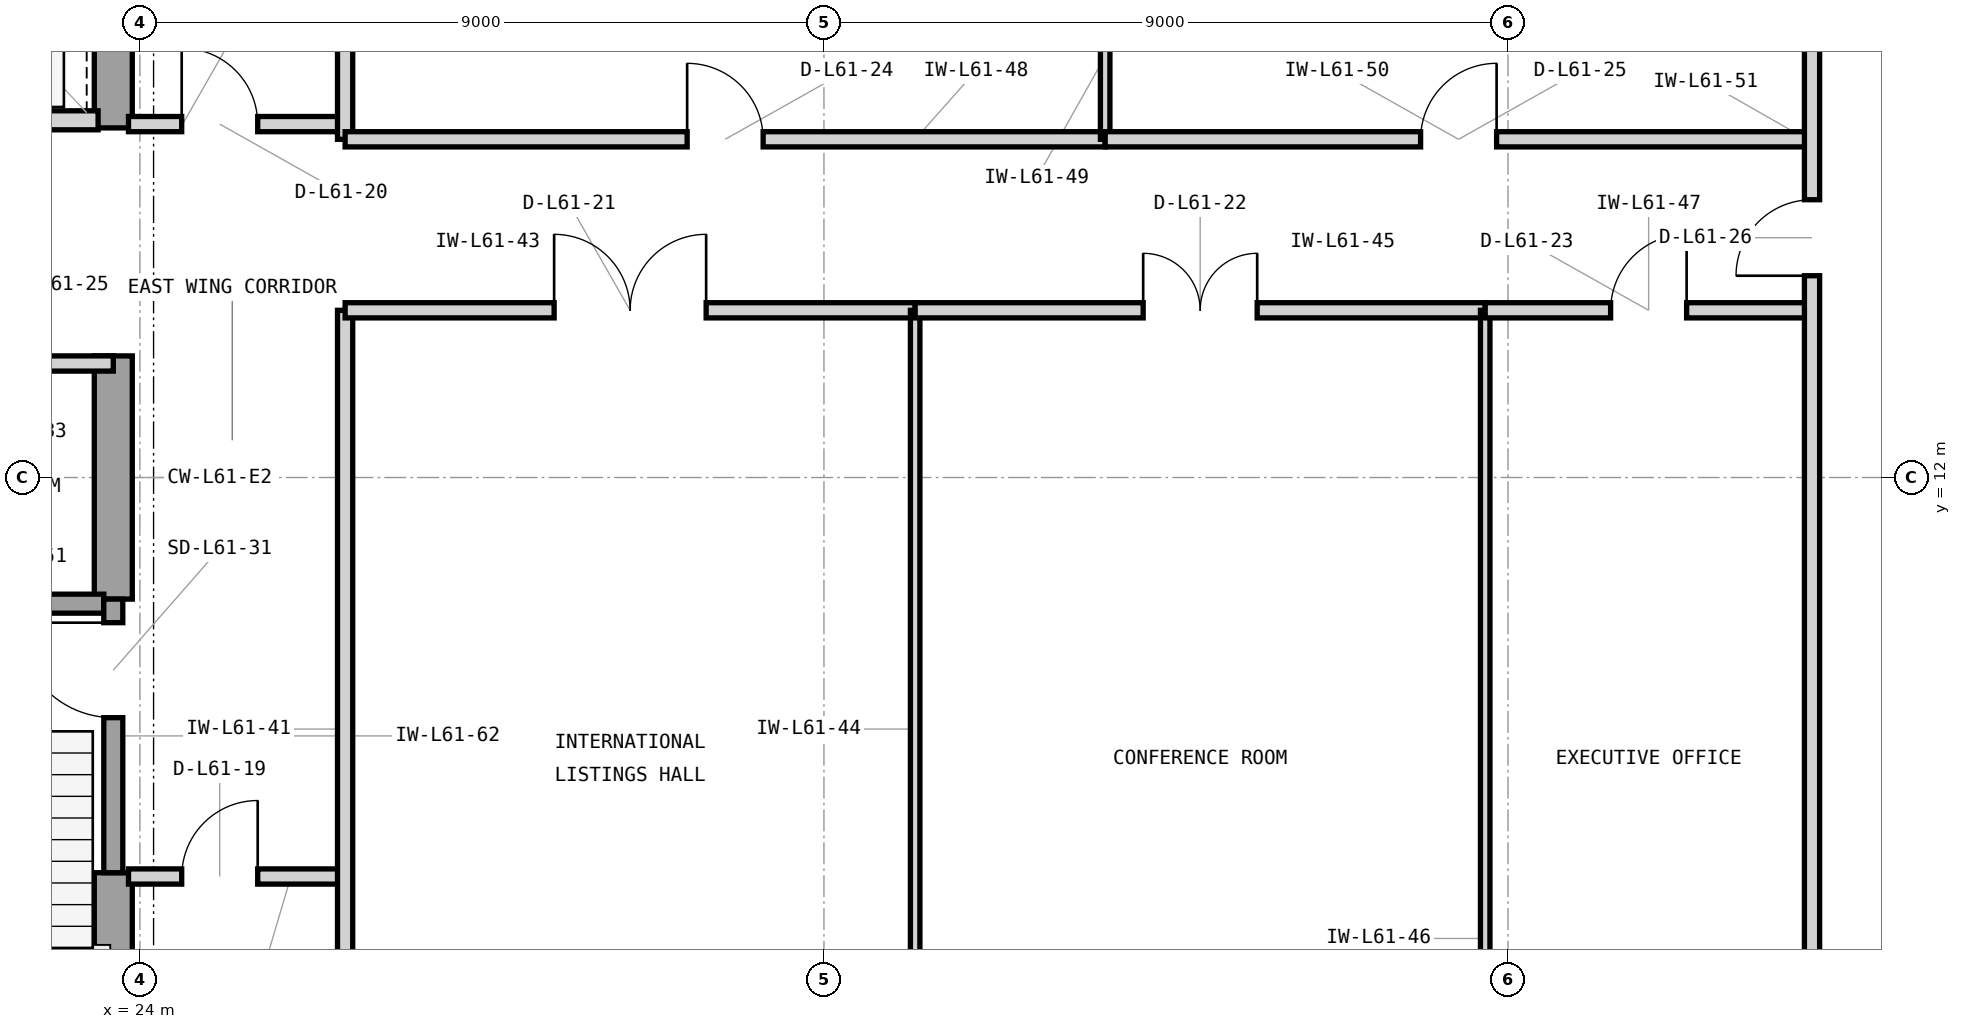
"""IFC4 building model, lengths in metres.
Left out: names, types, materials, properties, quantities, classifications, styles, units other than length and angle.
Written with IfcOpenShell. Run it as: python <this file> out.ifc"""

import sys

from ifc_helpers import new_model, si_unit, direction, frame, frame_2d, origin, place, context, subcontext, project, spatial, rectangle, extrude, element, fill, save


model = new_model("IFC4")
c1 = context("Model", 3, precision=1e-05, world=origin(), true_north=direction((0.0, 1.0)))
c2 = subcontext(c1, "Body", "Model", "MODEL_VIEW")
j1 = project(units=[si_unit("LENGTHUNIT", "METRE"), si_unit("PLANEANGLEUNIT", "RADIAN")], contexts=[c1])
p1 = place(None, origin())
s1 = spatial("IfcSite", under=j1, at=p1, CompositionType="ELEMENT")
p2 = place(p1, origin())
s2 = spatial("IfcBuilding", under=s1, at=p2, CompositionType="ELEMENT")
p3 = place(p2, frame((0.0, 0.0, 250.8)))
s3 = spatial("IfcBuildingStorey", under=s2, at=p3, CompositionType="ELEMENT", Elevation=250.8)
p4 = place(p3, frame((23.65, 3.6, 0.0), z_axis=(0.0, 0.0, 1.0), x_axis=(0.0, 1.0, 0.0)))
e1 = element("IfcWall", 1, at=p4, inside=s3, PredefinedType="SHEAR", context=c2, shape_type="SweptSolid", body=[
    extrude(rectangle(XDim=3.2, YDim=0.5, at=frame_2d((1.6, 0.0))), origin(), (0.0, 0.0, 1.0), 3.9),
])
p5 = place(p3, frame((23.65, 10.4, 0.0), z_axis=(0.0, 0.0, 1.0), x_axis=(0.0, 1.0, 0.0)))
e2 = element("IfcWall", 2, at=p5, inside=s3, PredefinedType="SHEAR", context=c2, shape_type="SweptSolid", body=[
    extrude(rectangle(XDim=3.2, YDim=0.5, at=frame_2d((1.6, 0.0))), origin(), (0.0, 0.0, 1.0), 3.9),
])
p6 = place(p3, frame((23.65, 16.6, 0.0), z_axis=(0.0, 0.0, 1.0), x_axis=(0.0, 1.0, 0.0)))
e3 = element("IfcWall", 3, at=p6, inside=s3, PredefinedType="SHEAR", context=c2, shape_type="SweptSolid", body=[
    extrude(rectangle(XDim=4.05, YDim=0.5, at=frame_2d((2.025, 0.0))), origin(), (0.0, 0.0, 1.0), 3.9),
])
p7 = place(p3, frame((21.05, 16.7, 0.0), z_axis=(0.0, 0.0, 1.0), x_axis=(1.0, 0.0, 0.0)))
e4 = element("IfcWall", 4, at=p7, inside=s3, PredefinedType="PARTITIONING", context=c2, shape_type="SweptSolid", body=[
    extrude(rectangle(XDim=2.4, YDim=0.25, at=frame_2d((1.2, 0.0))), origin(), (0.0, 0.0, 1.0), 3.088),
])
p8 = place(p7, frame((0.52, 0.0, 0.0)))
e5 = element("IfcOpeningElement", 5, at=p8, cuts=e4, PredefinedType="OPENING", context=c2, shape_type="SweptSolid", body=[
    extrude(rectangle(XDim=1.15, YDim=2.25, at=frame_2d((0.575, 1.125))), frame((0.0, 0.135, 0.0), z_axis=(0.0, -1.0, 0.0), x_axis=(1.0, 0.0, 0.0)), (0.0, 0.0, 1.0), 0.27),
])
p9 = place(p3, frame((18.45, 13.5, 0.0), z_axis=(0.0, 0.0, 1.0), x_axis=(1.0, 0.0, 0.0)))
e6 = element("IfcWall", 6, at=p9, inside=s3, PredefinedType="PARTITIONING", context=c2, shape_type="SweptSolid", body=[
    extrude(rectangle(XDim=5.2, YDim=0.2, at=frame_2d((2.6, 0.0))), origin(), (0.0, 0.0, 1.0), 3.088),
])
p10 = place(p9, frame((2.125, 0.0, 0.0)))
e7 = element("IfcOpeningElement", 7, at=p10, cuts=e6, PredefinedType="OPENING", context=c2, shape_type="SweptSolid", body=[
    extrude(rectangle(XDim=0.95, YDim=2.1, at=frame_2d((0.475, 1.05))), frame((0.0, 0.11, 0.0), z_axis=(0.0, -1.0, 0.0), x_axis=(1.0, 0.0, 0.0)), (0.0, 0.0, 1.0), 0.22),
])
p11 = place(p3, frame((23.85, 6.75, 0.0), z_axis=(0.0, 0.0, 1.0), x_axis=(1.0, 0.0, 0.0)))
e8 = element("IfcWall", 8, at=p11, inside=s3, PredefinedType="PARTITIONING", context=c2, shape_type="SweptSolid", body=[
    extrude(rectangle(XDim=2.85, YDim=0.2, at=frame_2d((1.425, 0.0))), origin(), (0.0, 0.0, 1.0), 3.63),
])
p12 = place(p11, frame((0.7, 0.0, 0.0)))
e9 = element("IfcOpeningElement", 9, at=p12, cuts=e8, PredefinedType="OPENING", context=c2, shape_type="SweptSolid", body=[
    extrude(rectangle(XDim=1.0, YDim=2.15, at=frame_2d((0.5, 1.075))), frame((0.0, 0.11, 0.0), z_axis=(0.0, -1.0, 0.0), x_axis=(1.0, 0.0, 0.0)), (0.0, 0.0, 1.0), 0.22),
])
p13 = place(p3, frame((23.85, 16.65, 0.0), z_axis=(0.0, 0.0, 1.0), x_axis=(1.0, 0.0, 0.0)))
e10 = element("IfcWall", 10, at=p13, inside=s3, PredefinedType="PARTITIONING", context=c2, shape_type="SweptSolid", body=[
    extrude(rectangle(XDim=2.85, YDim=0.2, at=frame_2d((1.425, 0.0))), origin(), (0.0, 0.0, 1.0), 3.63),
])
p14 = place(p13, frame((0.7, 0.0, 0.0)))
e11 = element("IfcOpeningElement", 11, at=p14, cuts=e10, PredefinedType="OPENING", context=c2, shape_type="SweptSolid", body=[
    extrude(rectangle(XDim=1.0, YDim=2.15, at=frame_2d((0.5, 1.075))), frame((0.0, 0.11, 0.0), z_axis=(0.0, -1.0, 0.0), x_axis=(1.0, 0.0, 0.0)), (0.0, 0.0, 1.0), 0.22),
])
p15 = place(p3, frame((26.7, 3.18, 0.0), z_axis=(0.0, 0.0, 1.0), x_axis=(0.0, 1.0, 0.0)))
e12 = element("IfcWall", 12, at=p15, inside=s3, PredefinedType="PARTITIONING", context=c2, shape_type="SweptSolid", body=[
    extrude(rectangle(XDim=11.02, YDim=0.2, at=frame_2d((5.51, 0.0))), origin(), (0.0, 0.0, 1.0), 3.63),
])
p16 = place(p3, frame((26.7, 16.45, 0.0), z_axis=(0.0, 0.0, 1.0), x_axis=(0.0, 1.0, 0.0)))
e13 = element("IfcWall", 13, at=p16, inside=s3, PredefinedType="PARTITIONING", context=c2, shape_type="SweptSolid", body=[
    extrude(rectangle(XDim=4.37, YDim=0.2, at=frame_2d((2.185, 0.0))), origin(), (0.0, 0.0, 1.0), 3.63),
])
p17 = place(p3, frame((26.7, 14.2, 0.0), z_axis=(0.0, 0.0, 1.0), x_axis=(1.0, 0.0, 0.0)))
e14 = element("IfcWall", 14, at=p17, inside=s3, PredefinedType="PARTITIONING", context=c2, shape_type="SweptSolid", body=[
    extrude(rectangle(XDim=7.5, YDim=0.2, at=frame_2d((3.75, 0.0))), origin(), (0.0, 0.0, 1.0), 3.63),
])
p18 = place(p17, frame((2.75, 0.0, 0.0)))
e15 = element("IfcOpeningElement", 15, at=p18, cuts=e14, PredefinedType="OPENING", context=c2, shape_type="SweptSolid", body=[
    extrude(rectangle(XDim=2.0, YDim=2.5, at=frame_2d((1.0, 1.25))), frame((0.0, 0.11, 0.0), z_axis=(0.0, -1.0, 0.0), x_axis=(1.0, 0.0, 0.0)), (0.0, 0.0, 1.0), 0.22),
])
p19 = place(p3, frame((34.2, 3.18, 0.0), z_axis=(0.0, 0.0, 1.0), x_axis=(0.0, 1.0, 0.0)))
e16 = element("IfcWall", 16, at=p19, inside=s3, PredefinedType="PARTITIONING", context=c2, shape_type="SweptSolid", body=[
    extrude(rectangle(XDim=11.02, YDim=0.125, at=frame_2d((5.51, 0.0))), origin(), (0.0, 0.0, 1.0), 3.63),
])
p20 = place(p3, frame((34.2, 14.2, 0.0), z_axis=(0.0, 0.0, 1.0), x_axis=(1.0, 0.0, 0.0)))
e17 = element("IfcWall", 17, at=p20, inside=s3, PredefinedType="PARTITIONING", context=c2, shape_type="SweptSolid", body=[
    extrude(rectangle(XDim=7.5, YDim=0.2, at=frame_2d((3.75, 0.0))), origin(), (0.0, 0.0, 1.0), 3.63),
])
p21 = place(p20, frame((3.0, 0.0, 0.0)))
e18 = element("IfcOpeningElement", 18, at=p21, cuts=e17, PredefinedType="OPENING", context=c2, shape_type="SweptSolid", body=[
    extrude(rectangle(XDim=1.5, YDim=2.3, at=frame_2d((0.75, 1.15))), frame((0.0, 0.11, 0.0), z_axis=(0.0, -1.0, 0.0), x_axis=(1.0, 0.0, 0.0)), (0.0, 0.0, 1.0), 0.22),
])
p22 = place(p3, frame((41.7, 3.18, 0.0), z_axis=(0.0, 0.0, 1.0), x_axis=(0.0, 1.0, 0.0)))
e19 = element("IfcWall", 19, at=p22, inside=s3, PredefinedType="PARTITIONING", context=c2, shape_type="SweptSolid", body=[
    extrude(rectangle(XDim=11.02, YDim=0.125, at=frame_2d((5.51, 0.0))), origin(), (0.0, 0.0, 1.0), 3.63),
])
p23 = place(p3, frame((41.7, 14.2, 0.0), z_axis=(0.0, 0.0, 1.0), x_axis=(1.0, 0.0, 0.0)))
e20 = element("IfcWall", 20, at=p23, inside=s3, PredefinedType="PARTITIONING", context=c2, shape_type="SweptSolid", body=[
    extrude(rectangle(XDim=4.3, YDim=0.2, at=frame_2d((2.15, 0.0))), origin(), (0.0, 0.0, 1.0), 3.63),
])
p24 = place(p23, frame((1.65, 0.0, 0.0)))
e21 = element("IfcOpeningElement", 21, at=p24, cuts=e20, PredefinedType="OPENING", context=c2, shape_type="SweptSolid", body=[
    extrude(rectangle(XDim=1.0, YDim=2.15, at=frame_2d((0.5, 1.075))), frame((0.0, 0.11, 0.0), z_axis=(0.0, -1.0, 0.0), x_axis=(1.0, 0.0, 0.0)), (0.0, 0.0, 1.0), 0.22),
])
p25 = place(p3, frame((26.7, 16.45, 0.0), z_axis=(0.0, 0.0, 1.0), x_axis=(1.0, 0.0, 0.0)))
e22 = element("IfcWall", 22, at=p25, inside=s3, PredefinedType="PARTITIONING", context=c2, shape_type="SweptSolid", body=[
    extrude(rectangle(XDim=10.0, YDim=0.2, at=frame_2d((5.0, 0.0))), origin(), (0.0, 0.0, 1.0), 3.63),
])
p26 = place(p25, frame((4.5, 0.0, 0.0)))
e23 = element("IfcOpeningElement", 23, at=p26, cuts=e22, PredefinedType="OPENING", context=c2, shape_type="SweptSolid", body=[
    extrude(rectangle(XDim=1.0, YDim=2.15, at=frame_2d((0.5, 1.075))), frame((0.0, 0.11, 0.0), z_axis=(0.0, -1.0, 0.0), x_axis=(1.0, 0.0, 0.0)), (0.0, 0.0, 1.0), 0.22),
])
p27 = place(p3, frame((36.7, 16.45, 0.0), z_axis=(0.0, 0.0, 1.0), x_axis=(0.0, 1.0, 0.0)))
e24 = element("IfcWall", 24, at=p27, inside=s3, PredefinedType="PARTITIONING", context=c2, shape_type="SweptSolid", body=[
    extrude(rectangle(XDim=4.37, YDim=0.125, at=frame_2d((2.185, 0.0))), origin(), (0.0, 0.0, 1.0), 3.63),
])
p28 = place(p3, frame((36.7, 16.45, 0.0), z_axis=(0.0, 0.0, 1.0), x_axis=(1.0, 0.0, 0.0)))
e25 = element("IfcWall", 25, at=p28, inside=s3, PredefinedType="PARTITIONING", context=c2, shape_type="SweptSolid", body=[
    extrude(rectangle(XDim=9.3, YDim=0.2, at=frame_2d((4.65, 0.0))), origin(), (0.0, 0.0, 1.0), 3.63),
])
p29 = place(p28, frame((4.15, 0.0, 0.0)))
e26 = element("IfcOpeningElement", 26, at=p29, cuts=e25, PredefinedType="OPENING", context=c2, shape_type="SweptSolid", body=[
    extrude(rectangle(XDim=1.0, YDim=2.15, at=frame_2d((0.5, 1.075))), frame((0.0, 0.11, 0.0), z_axis=(0.0, -1.0, 0.0), x_axis=(1.0, 0.0, 0.0)), (0.0, 0.0, 1.0), 0.22),
])
p30 = place(p3, frame((46.0, 3.18, 0.0), z_axis=(0.0, 0.0, 1.0), x_axis=(0.0, 1.0, 0.0)))
e27 = element("IfcWall", 27, at=p30, inside=s3, PredefinedType="PARTITIONING", context=c2, shape_type="SweptSolid", body=[
    extrude(rectangle(XDim=17.64, YDim=0.2, at=frame_2d((8.82, 0.0))), origin(), (0.0, 0.0, 1.0), 3.63),
])
p31 = place(p30, frame((11.475, 0.0, 0.0)))
e28 = element("IfcOpeningElement", 28, at=p31, cuts=e27, PredefinedType="OPENING", context=c2, shape_type="SweptSolid", body=[
    extrude(rectangle(XDim=1.0, YDim=2.15, at=frame_2d((0.5, 1.075))), frame((0.0, 0.11, 0.0), z_axis=(0.0, -1.0, 0.0), x_axis=(1.0, 0.0, 0.0)), (0.0, 0.0, 1.0), 0.22),
])
p32 = place(p3, frame((19.705, 10.34, 0.0), z_axis=(0.0, 0.0, 1.0), x_axis=(1.0, 0.0, 0.0)))
e29 = element("IfcWall", 29, at=p32, inside=s3, PredefinedType="SHEAR", context=c2, shape_type="SweptSolid", body=[
    extrude(rectangle(XDim=3.82, YDim=0.25, at=frame_2d((1.91, 0.0))), origin(), (0.0, 0.0, 1.0), 3.9),
])
p33 = place(p3, frame((23.65, 6.8, 0.0), z_axis=(0.0, 0.0, 1.0), x_axis=(0.0, 1.0, 0.0)))
e30 = element("IfcWall", 30, at=p33, inside=s3, PredefinedType="SHEAR", context=c2, shape_type="SweptSolid", body=[
    extrude(rectangle(XDim=3.6, YDim=0.25, at=frame_2d((1.8, 0.0))), origin(), (0.0, 0.0, 1.0), 3.9),
])
p34 = place(p33, frame((2.04, 0.0, 0.0)))
e31 = element("IfcOpeningElement", 31, at=p34, cuts=e30, PredefinedType="OPENING", context=c2, shape_type="SweptSolid", body=[
    extrude(rectangle(XDim=1.25, YDim=2.2, at=frame_2d((0.625, 1.1))), frame((0.0, 0.135, 0.0), z_axis=(0.0, -1.0, 0.0), x_axis=(1.0, 0.0, 0.0)), (0.0, 0.0, 1.0), 0.27),
])
p35 = place(p12, origin())
e32 = element("IfcDoor", 32, at=p35, inside=s3, OperationType="SINGLE_SWING_RIGHT", PredefinedType="DOOR", context=c2, shape_type="SweptSolid", body=[
    extrude(rectangle(XDim=1.0, YDim=2.15, at=frame_2d((0.5, 1.075))), frame((0.0, 0.025, 0.0), z_axis=(0.0, -1.0, 0.0), x_axis=(1.0, 0.0, 0.0)), (0.0, 0.0, 1.0), 0.05),
])
fill(e9, e32)
p36 = place(p14, origin())
e33 = element("IfcDoor", 33, at=p36, inside=s3, OperationType="SINGLE_SWING_LEFT", PredefinedType="DOOR", context=c2, shape_type="SweptSolid", body=[
    extrude(rectangle(XDim=1.0, YDim=2.15, at=frame_2d((0.5, 1.075))), frame((0.0, 0.025, 0.0), z_axis=(0.0, -1.0, 0.0), x_axis=(1.0, 0.0, 0.0)), (0.0, 0.0, 1.0), 0.05),
])
fill(e11, e33)
p37 = place(p18, origin())
e34 = element("IfcDoor", 34, at=p37, inside=s3, OperationType="DOUBLE_DOOR_SINGLE_SWING", PredefinedType="DOOR", context=c2, shape_type="SweptSolid", body=[
    extrude(rectangle(XDim=2.0, YDim=2.5, at=frame_2d((1.0, 1.25))), frame((0.0, 0.025, 0.0), z_axis=(0.0, -1.0, 0.0), x_axis=(1.0, 0.0, 0.0)), (0.0, 0.0, 1.0), 0.05),
])
fill(e15, e34)
p38 = place(p21, origin())
e35 = element("IfcDoor", 35, at=p38, inside=s3, OperationType="DOUBLE_DOOR_SINGLE_SWING", PredefinedType="DOOR", context=c2, shape_type="SweptSolid", body=[
    extrude(rectangle(XDim=1.5, YDim=2.3, at=frame_2d((0.75, 1.15))), frame((0.0, 0.025, 0.0), z_axis=(0.0, -1.0, 0.0), x_axis=(1.0, 0.0, 0.0)), (0.0, 0.0, 1.0), 0.05),
])
fill(e18, e35)
p39 = place(p24, origin())
e36 = element("IfcDoor", 36, at=p39, inside=s3, OperationType="SINGLE_SWING_RIGHT", PredefinedType="DOOR", context=c2, shape_type="SweptSolid", body=[
    extrude(rectangle(XDim=1.0, YDim=2.15, at=frame_2d((0.5, 1.075))), frame((0.0, 0.025, 0.0), z_axis=(0.0, -1.0, 0.0), x_axis=(1.0, 0.0, 0.0)), (0.0, 0.0, 1.0), 0.05),
])
fill(e21, e36)
p40 = place(p26, origin())
e37 = element("IfcDoor", 37, at=p40, inside=s3, OperationType="SINGLE_SWING_LEFT", PredefinedType="DOOR", context=c2, shape_type="SweptSolid", body=[
    extrude(rectangle(XDim=1.0, YDim=2.15, at=frame_2d((0.5, 1.075))), frame((0.0, 0.025, 0.0), z_axis=(0.0, -1.0, 0.0), x_axis=(1.0, 0.0, 0.0)), (0.0, 0.0, 1.0), 0.05),
])
fill(e23, e37)
p41 = place(p29, origin())
e38 = element("IfcDoor", 38, at=p41, inside=s3, OperationType="SINGLE_SWING_RIGHT", PredefinedType="DOOR", context=c2, shape_type="SweptSolid", body=[
    extrude(rectangle(XDim=1.0, YDim=2.15, at=frame_2d((0.5, 1.075))), frame((0.0, 0.025, 0.0), z_axis=(0.0, -1.0, 0.0), x_axis=(1.0, 0.0, 0.0)), (0.0, 0.0, 1.0), 0.05),
])
fill(e26, e38)
p42 = place(p31, origin())
e39 = element("IfcDoor", 39, at=p42, inside=s3, OperationType="SINGLE_SWING_LEFT", PredefinedType="DOOR", context=c2, shape_type="SweptSolid", body=[
    extrude(rectangle(XDim=1.0, YDim=2.15, at=frame_2d((0.5, 1.075))), frame((0.0, 0.025, 0.0), z_axis=(0.0, -1.0, 0.0), x_axis=(1.0, 0.0, 0.0)), (0.0, 0.0, 1.0), 0.05),
])
fill(e28, e39)
p43 = place(p34, origin())
e40 = element("IfcDoor", 40, at=p43, inside=s3, OperationType="SINGLE_SWING_RIGHT", PredefinedType="DOOR", context=c2, shape_type="SweptSolid", body=[
    extrude(rectangle(XDim=1.25, YDim=2.2, at=frame_2d((0.625, 1.1))), frame((0.0, 0.025, 0.0), z_axis=(0.0, -1.0, 0.0), x_axis=(1.0, 0.0, 0.0)), (0.0, 0.0, 1.0), 0.05),
])
fill(e31, e40)
save(model, sys.argv[1])
